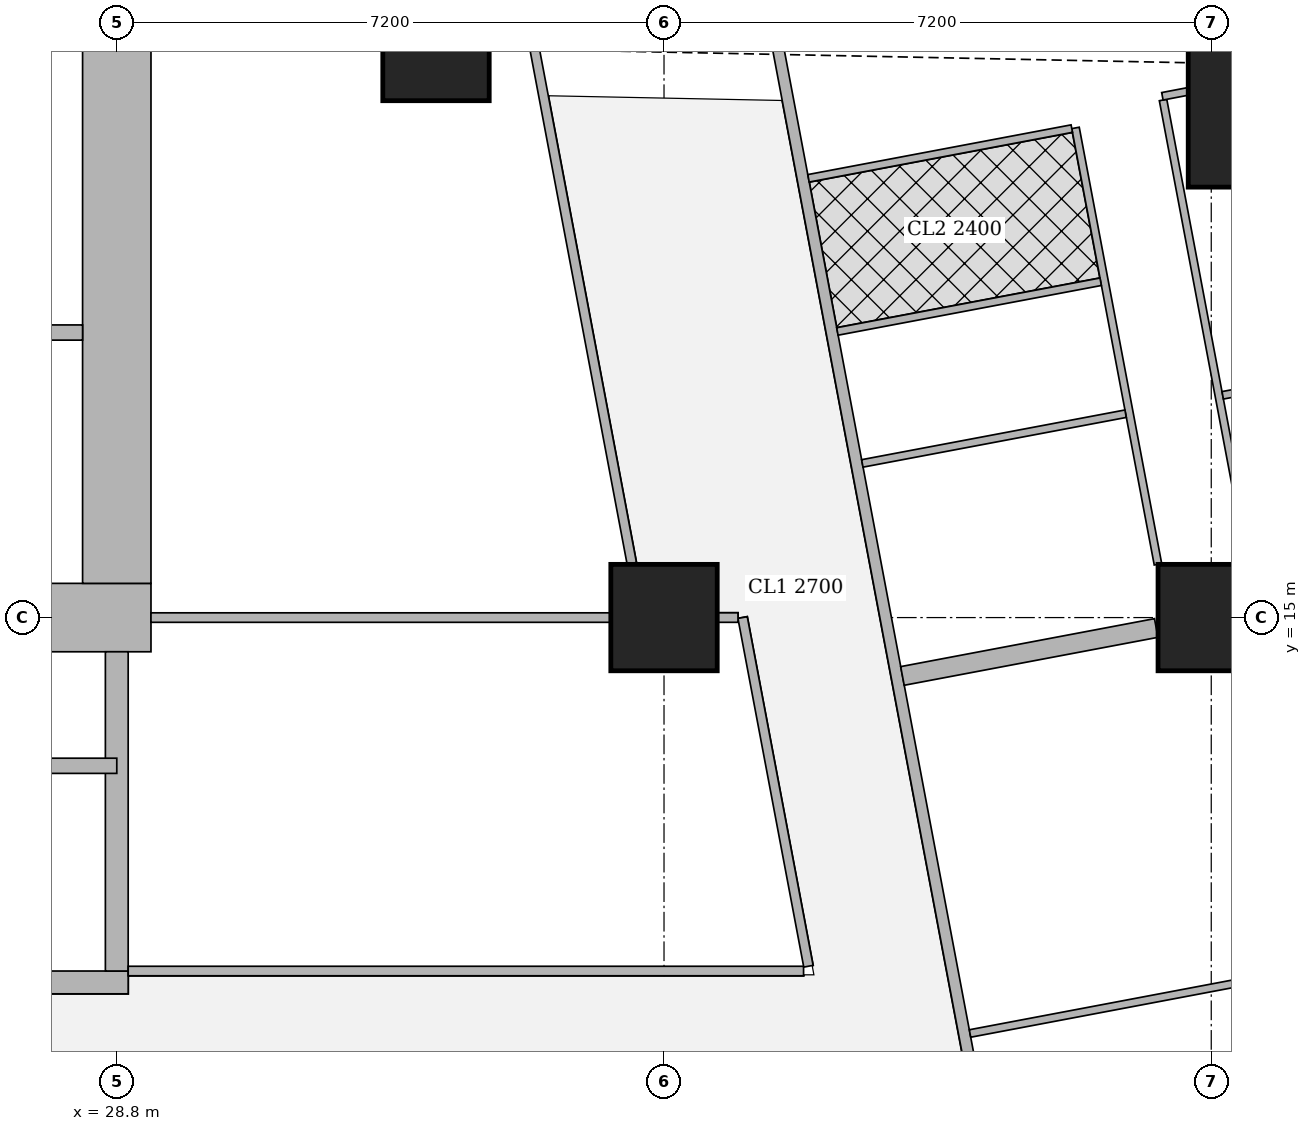
"""IFC4 building model, lengths in metres.
Left out: names, types, materials, properties, quantities, classifications, styles, units other than length and angle.
Written with IfcOpenShell. Run it as: python <this file> out.ifc"""

import sys

from ifc_helpers import new_model, si_unit, direction, frame, frame_2d, origin, origin_2d, place, context, subcontext, project, spatial, rectangle, extrude, element, fill, save


model = new_model("IFC4")
c1 = context("Model", 3, precision=1e-05, world=origin(), true_north=direction((0.0, 1.0)))
c2 = subcontext(c1, "Body", "Model", "MODEL_VIEW")
j1 = project(units=[si_unit("LENGTHUNIT", "METRE"), si_unit("PLANEANGLEUNIT", "RADIAN")], contexts=[c1])
p1 = place(None, origin())
s1 = spatial("IfcSite", under=j1, at=p1, CompositionType="ELEMENT")
p2 = place(p1, origin())
s2 = spatial("IfcBuilding", under=s1, at=p2, CompositionType="ELEMENT")
p3 = place(p2, frame((0.0, 0.0, 223.7)))
s3 = spatial("IfcBuildingStorey", under=s2, at=p3, CompositionType="ELEMENT", Elevation=223.7)
for number, where, z_axis, x_axis in (
    (1, (36.0, 15.0, 0.0), (0.0, 0.0, 1.0), (1.0, 0.0, 0.0)),
    (2, (43.2, 15.0, 0.0), (0.0, 0.0, 1.0), (1.0, 0.0, 0.0)),
    (3, (33.0, 22.5, 0.0), (0.0, 0.0, 1.0), (1.0, 0.0, 0.0)),
):
    element("IfcColumn", number, at=place(p3, frame(where, z_axis=z_axis, x_axis=x_axis)), inside=s3, PredefinedType="COLUMN", context=c2, shape_type="SweptSolid", body=[
        extrude(rectangle(XDim=1.4, YDim=1.4, at=origin_2d()), origin(), (0.0, 0.0, 1.0), 3.75),
    ])
p4 = place(p3, frame((44.697, 22.263, 0.0), z_axis=(0.0, 0.0, 1.0), x_axis=(1.0, 0.0, 0.0)))
e4 = element("IfcColumn", 4, at=p4, inside=s3, PredefinedType="COLUMN", context=c2, shape_type="SweptSolid", body=[
    extrude(rectangle(XDim=3.6, YDim=3.2, at=origin_2d()), origin(), (0.0, 0.0, 1.0), 3.75),
])
p5 = place(p3, frame((13.95, 15.0, 0.0), z_axis=(0.0, 0.0, 1.0), x_axis=(1.0, 0.0, 0.0)))
e5 = element("IfcWall", 5, at=p5, inside=s3, PredefinedType="SHEAR", context=c2, shape_type="SweptSolid", body=[
    extrude(rectangle(XDim=15.3, YDim=0.9, at=frame_2d((7.65, 0.0))), origin(), (0.0, 0.0, 1.0), 3.75),
])
p6 = place(p5, frame((4.45, 0.0, 0.0)))
e6 = element("IfcOpeningElement", 6, at=p6, cuts=e5, PredefinedType="OPENING", context=c2, shape_type="SweptSolid", body=[
    extrude(rectangle(XDim=1.8, YDim=2.1, at=frame_2d((0.9, 1.05))), frame((0.0, 0.46, 0.0), z_axis=(0.0, -1.0, 0.0), x_axis=(1.0, 0.0, 0.0)), (0.0, 0.0, 1.0), 0.92),
])
p7 = place(p5, frame((10.7, 0.0, 0.0)))
e7 = element("IfcOpeningElement", 7, at=p7, cuts=e5, PredefinedType="OPENING", context=c2, shape_type="SweptSolid", body=[
    extrude(rectangle(XDim=1.1, YDim=2.1, at=frame_2d((0.55, 1.05))), frame((0.0, 0.46, 0.0), z_axis=(0.0, -1.0, 0.0), x_axis=(1.0, 0.0, 0.0)), (0.0, 0.0, 1.0), 0.92),
])
p8 = place(p3, frame((28.8, 15.45, 0.0), z_axis=(0.0, 0.0, 1.0), x_axis=(0.0, 1.0, 0.0)))
e8 = element("IfcWall", 8, at=p8, inside=s3, PredefinedType="SHEAR", context=c2, shape_type="SweptSolid", body=[
    extrude(rectangle(XDim=14.1, YDim=0.9, at=frame_2d((7.05, 0.0))), origin(), (0.0, 0.0, 1.0), 3.75),
])
p9 = place(p3, frame((21.45, 10.2, 0.0), z_axis=(0.0, 0.0, 1.0), x_axis=(1.0, 0.0, 0.0)))
e9 = element("IfcWall", 9, at=p9, inside=s3, PredefinedType="SHEAR", context=c2, shape_type="SweptSolid", body=[
    extrude(rectangle(XDim=7.5, YDim=0.3, at=frame_2d((3.75, 0.0))), origin(), (0.0, 0.0, 1.0), 3.75),
])
p10 = place(p9, frame((0.5, 0.0, 0.0)))
e10 = element("IfcOpeningElement", 10, at=p10, cuts=e9, PredefinedType="OPENING", context=c2, shape_type="SweptSolid", body=[
    extrude(rectangle(XDim=1.1, YDim=2.1, at=frame_2d((0.55, 1.05))), frame((0.0, 0.16, 0.0), z_axis=(0.0, -1.0, 0.0), x_axis=(1.0, 0.0, 0.0)), (0.0, 0.0, 1.0), 0.32),
])
p11 = place(p3, frame((28.8, 10.35, 0.0), z_axis=(0.0, 0.0, 1.0), x_axis=(0.0, 1.0, 0.0)))
e11 = element("IfcWall", 11, at=p11, inside=s3, PredefinedType="SHEAR", context=c2, shape_type="SweptSolid", body=[
    extrude(rectangle(XDim=4.2, YDim=0.3, at=frame_2d((2.1, 0.0))), origin(), (0.0, 0.0, 1.0), 3.75),
])
p12 = place(p3, frame((50.653, 2.703, 0.0), z_axis=(0.0, 0.0, 1.0), x_axis=(-0.185612026696, 0.982623109613, 0.0)))
e12 = element("IfcWall", 12, at=p12, inside=s3, PredefinedType="SOLIDWALL", context=c2, shape_type="SweptSolid", body=[
    extrude(rectangle(XDim=41.393, YDim=0.2, at=frame_2d((20.697, 0.0))), origin(), (0.0, 0.0, 1.0), 3.5),
])
p13 = place(p12, frame((1.633, 0.0, 0.9)))
e13 = element("IfcOpeningElement", 13, at=p13, cuts=e12, PredefinedType="OPENING", context=c2, shape_type="SweptSolid", body=[
    extrude(rectangle(XDim=1.8, YDim=1.5, at=frame_2d((0.9, 0.75))), frame((0.0, 0.11, 0.0), z_axis=(0.0, -1.0, 0.0), x_axis=(1.0, 0.0, 0.0)), (0.0, 0.0, 1.0), 0.22),
])
p14 = place(p12, frame((6.032, 0.0, 0.9)))
e14 = element("IfcOpeningElement", 14, at=p14, cuts=e12, PredefinedType="OPENING", context=c2, shape_type="SweptSolid", body=[
    extrude(rectangle(XDim=1.8, YDim=1.5, at=frame_2d((0.9, 0.75))), frame((0.0, 0.11, 0.0), z_axis=(0.0, -1.0, 0.0), x_axis=(1.0, 0.0, 0.0)), (0.0, 0.0, 1.0), 0.22),
])
p15 = place(p12, frame((9.848, 0.0, 0.9)))
e15 = element("IfcOpeningElement", 15, at=p15, cuts=e12, PredefinedType="OPENING", context=c2, shape_type="SweptSolid", body=[
    extrude(rectangle(XDim=1.8, YDim=1.5, at=frame_2d((0.9, 0.75))), frame((0.0, 0.11, 0.0), z_axis=(0.0, -1.0, 0.0), x_axis=(1.0, 0.0, 0.0)), (0.0, 0.0, 1.0), 0.22),
])
p16 = place(p12, frame((13.664, 0.0, 0.9)))
e16 = element("IfcOpeningElement", 16, at=p16, cuts=e12, PredefinedType="OPENING", context=c2, shape_type="SweptSolid", body=[
    extrude(rectangle(XDim=1.8, YDim=1.5, at=frame_2d((0.9, 0.75))), frame((0.0, 0.11, 0.0), z_axis=(0.0, -1.0, 0.0), x_axis=(1.0, 0.0, 0.0)), (0.0, 0.0, 1.0), 0.22),
])
p17 = place(p12, frame((17.481, 0.0, 0.9)))
e17 = element("IfcOpeningElement", 17, at=p17, cuts=e12, PredefinedType="OPENING", context=c2, shape_type="SweptSolid", body=[
    extrude(rectangle(XDim=1.8, YDim=1.5, at=frame_2d((0.9, 0.75))), frame((0.0, 0.11, 0.0), z_axis=(0.0, -1.0, 0.0), x_axis=(1.0, 0.0, 0.0)), (0.0, 0.0, 1.0), 0.22),
])
p18 = place(p12, frame((21.297, 0.0, 0.9)))
e18 = element("IfcOpeningElement", 18, at=p18, cuts=e12, PredefinedType="OPENING", context=c2, shape_type="SweptSolid", body=[
    extrude(rectangle(XDim=1.8, YDim=1.5, at=frame_2d((0.9, 0.75))), frame((0.0, 0.11, 0.0), z_axis=(0.0, -1.0, 0.0), x_axis=(1.0, 0.0, 0.0)), (0.0, 0.0, 1.0), 0.22),
])
p19 = place(p12, frame((25.113, 0.0, 0.9)))
e19 = element("IfcOpeningElement", 19, at=p19, cuts=e12, PredefinedType="OPENING", context=c2, shape_type="SweptSolid", body=[
    extrude(rectangle(XDim=1.8, YDim=1.5, at=frame_2d((0.9, 0.75))), frame((0.0, 0.11, 0.0), z_axis=(0.0, -1.0, 0.0), x_axis=(1.0, 0.0, 0.0)), (0.0, 0.0, 1.0), 0.22),
])
p20 = place(p12, frame((28.93, 0.0, 0.9)))
e20 = element("IfcOpeningElement", 20, at=p20, cuts=e12, PredefinedType="OPENING", context=c2, shape_type="SweptSolid", body=[
    extrude(rectangle(XDim=1.8, YDim=1.5, at=frame_2d((0.9, 0.75))), frame((0.0, 0.11, 0.0), z_axis=(0.0, -1.0, 0.0), x_axis=(1.0, 0.0, 0.0)), (0.0, 0.0, 1.0), 0.22),
])
p21 = place(p12, frame((32.746, 0.0, 0.9)))
e21 = element("IfcOpeningElement", 21, at=p21, cuts=e12, PredefinedType="OPENING", context=c2, shape_type="SweptSolid", body=[
    extrude(rectangle(XDim=1.8, YDim=1.5, at=frame_2d((0.9, 0.75))), frame((0.0, 0.11, 0.0), z_axis=(0.0, -1.0, 0.0), x_axis=(1.0, 0.0, 0.0)), (0.0, 0.0, 1.0), 0.22),
])
p22 = place(p12, frame((36.481, 0.0, 0.9)))
e22 = element("IfcOpeningElement", 22, at=p22, cuts=e12, PredefinedType="OPENING", context=c2, shape_type="SweptSolid", body=[
    extrude(rectangle(XDim=1.8, YDim=1.5, at=frame_2d((0.9, 0.75))), frame((0.0, 0.11, 0.0), z_axis=(0.0, -1.0, 0.0), x_axis=(1.0, 0.0, 0.0)), (0.0, 0.0, 1.0), 0.22),
])
p23 = place(p3, frame((33.68, 42.723, 0.0), z_axis=(0.0, 0.0, 1.0), x_axis=(0.185601160014, -0.982625162207, 0.0)))
e23 = element("IfcWall", 23, at=p23, inside=s3, PredefinedType="SOLIDWALL", context=c2, shape_type="SweptSolid", body=[
    extrude(rectangle(XDim=41.051, YDim=0.15, at=frame_2d((20.526, 0.0))), origin(), (0.0, 0.0, 1.0), 2.5),
])
p24 = place(p23, frame((16.123, 0.0, 0.0)))
e24 = element("IfcOpeningElement", 24, at=p24, cuts=e23, PredefinedType="OPENING", context=c2, shape_type="SweptSolid", body=[
    extrude(rectangle(XDim=1.0, YDim=2.1, at=frame_2d((0.5, 1.05))), frame((0.0, 0.085, 0.0), z_axis=(0.0, -1.0, 0.0), x_axis=(1.0, 0.0, 0.0)), (0.0, 0.0, 1.0), 0.17),
])
p25 = place(p23, frame((19.938, 0.0, 0.0)))
e25 = element("IfcOpeningElement", 25, at=p25, cuts=e23, PredefinedType="OPENING", context=c2, shape_type="SweptSolid", body=[
    extrude(rectangle(XDim=1.0, YDim=2.1, at=frame_2d((0.5, 1.05))), frame((0.0, 0.085, 0.0), z_axis=(0.0, -1.0, 0.0), x_axis=(1.0, 0.0, 0.0)), (0.0, 0.0, 1.0), 0.17),
])
p26 = place(p23, frame((30.902, 0.0, 0.0)))
e26 = element("IfcOpeningElement", 26, at=p26, cuts=e23, PredefinedType="OPENING", context=c2, shape_type="SweptSolid", body=[
    extrude(rectangle(XDim=1.0, YDim=2.1, at=frame_2d((0.5, 1.05))), frame((0.0, 0.085, 0.0), z_axis=(0.0, -1.0, 0.0), x_axis=(1.0, 0.0, 0.0)), (0.0, 0.0, 1.0), 0.17),
])
p27 = place(p3, frame((42.566, 21.809, 0.0), z_axis=(0.0, 0.0, 1.0), x_axis=(0.185613526435, -0.98262282632, 0.0)))
e27 = element("IfcWall", 27, at=p27, inside=s3, PredefinedType="PARTITIONING", context=c2, shape_type="SweptSolid", body=[
    extrude(rectangle(XDim=6.207, YDim=0.1, at=frame_2d((3.104, 0.0))), origin(), (0.0, 0.0, 1.0), 2.5),
])
p28 = place(p27, frame((1.45, 0.0, 0.0)))
e28 = element("IfcOpeningElement", 28, at=p28, cuts=e27, PredefinedType="OPENING", context=c2, shape_type="SweptSolid", body=[
    extrude(rectangle(XDim=0.9, YDim=2.1, at=frame_2d((0.45, 1.05))), frame((0.0, 0.06, 0.0), z_axis=(0.0, -1.0, 0.0), x_axis=(1.0, 0.0, 0.0)), (0.0, 0.0, 1.0), 0.12),
])
p29 = place(p27, frame((4.163, 0.0, 0.0)))
e29 = element("IfcOpeningElement", 29, at=p29, cuts=e27, PredefinedType="OPENING", context=c2, shape_type="SweptSolid", body=[
    extrude(rectangle(XDim=0.9, YDim=2.1, at=frame_2d((0.45, 1.05))), frame((0.0, 0.06, 0.0), z_axis=(0.0, -1.0, 0.0), x_axis=(1.0, 0.0, 0.0)), (0.0, 0.0, 1.0), 0.12),
])
p30 = place(p3, frame((41.414, 21.442, 0.0), z_axis=(0.0, 0.0, 1.0), x_axis=(0.185698675093, -0.982606738257, 0.0)))
e30 = element("IfcWall", 30, at=p30, inside=s3, PredefinedType="PARTITIONING", context=c2, shape_type="SweptSolid", body=[
    extrude(rectangle(XDim=5.843, YDim=0.1, at=frame_2d((2.921, 0.0))), origin(), (0.0, 0.0, 1.0), 3.5),
])
p31 = place(p30, frame((0.575, 0.0, 0.0)))
e31 = element("IfcOpeningElement", 31, at=p31, cuts=e30, PredefinedType="OPENING", context=c2, shape_type="SweptSolid", body=[
    extrude(rectangle(XDim=0.9, YDim=2.1, at=frame_2d((0.45, 1.05))), frame((0.0, 0.06, 0.0), z_axis=(0.0, -1.0, 0.0), x_axis=(1.0, 0.0, 0.0)), (0.0, 0.0, 1.0), 0.12),
])
p32 = place(p30, frame((2.483, 0.0, 0.0)))
e32 = element("IfcOpeningElement", 32, at=p32, cuts=e30, PredefinedType="OPENING", context=c2, shape_type="SweptSolid", body=[
    extrude(rectangle(XDim=0.9, YDim=2.1, at=frame_2d((0.45, 1.05))), frame((0.0, 0.06, 0.0), z_axis=(0.0, -1.0, 0.0), x_axis=(1.0, 0.0, 0.0)), (0.0, 0.0, 1.0), 0.12),
])
p33 = place(p3, frame((42.887, 21.921, 0.0), z_axis=(0.0, 0.0, 1.0), x_axis=(-0.982274918032, -0.187445953293, 0.0)))
e33 = element("IfcWall", 33, at=p33, inside=s3, PredefinedType="PARTITIONING", context=c2, shape_type="SweptSolid", body=[
    extrude(rectangle(XDim=0.336, YDim=0.1, at=frame_2d((0.168, 0.0))), origin(), (0.0, 0.0, 1.0), 2.5),
])
p34 = place(p3, frame((47.527, 18.712, 0.0), z_axis=(0.0, 0.0, 1.0), x_axis=(-0.982665405803, -0.185387972203, 0.0)))
e34 = element("IfcWall", 34, at=p34, inside=s3, PredefinedType="PARTITIONING", context=c2, shape_type="SweptSolid", body=[
    extrude(rectangle(XDim=4.25, YDim=0.1, at=frame_2d((2.125, 0.0))), origin(), (0.0, 0.0, 1.0), 2.05),
])
p35 = place(p3, frame((41.365, 21.433, 0.0), z_axis=(0.0, 0.0, 1.0), x_axis=(-0.982638553676, -0.185530247748, 0.0)))
e35 = element("IfcWall", 35, at=p35, inside=s3, PredefinedType="PARTITIONING", context=c2, shape_type="SweptSolid", body=[
    extrude(rectangle(XDim=3.525, YDim=0.1, at=frame_2d((1.763, 0.0))), origin(), (0.0, 0.0, 1.0), 3.5),
])
p36 = place(p3, frame((42.073, 17.682, 0.0), z_axis=(0.0, 0.0, 1.0), x_axis=(-0.98265117712, -0.185463376723, 0.0)))
e36 = element("IfcWall", 36, at=p36, inside=s3, PredefinedType="PARTITIONING", context=c2, shape_type="SweptSolid", body=[
    extrude(rectangle(XDim=3.525, YDim=0.1, at=frame_2d((1.763, 0.0))), origin(), (0.0, 0.0, 1.0), 3.5),
])
p37 = place(p36, frame((1.325, 0.0, 0.0)))
e37 = element("IfcOpeningElement", 37, at=p37, cuts=e36, PredefinedType="OPENING", context=c2, shape_type="SweptSolid", body=[
    extrude(rectangle(XDim=0.9, YDim=2.1, at=frame_2d((0.45, 1.05))), frame((0.0, 0.06, 0.0), z_axis=(0.0, -1.0, 0.0), x_axis=(1.0, 0.0, 0.0)), (0.0, 0.0, 1.0), 0.12),
])
p38 = place(p3, frame((41.745, 19.418, 0.0), z_axis=(0.0, 0.0, 1.0), x_axis=(-0.982638553676, -0.185530247748, 0.0)))
e38 = element("IfcWall", 38, at=p38, inside=s3, PredefinedType="PARTITIONING", context=c2, shape_type="SweptSolid", body=[
    extrude(rectangle(XDim=3.525, YDim=0.1, at=frame_2d((1.763, 0.0))), origin(), (0.0, 0.0, 1.0), 3.5),
])
p39 = place(p3, frame((43.49, 10.183, 0.0), z_axis=(0.0, 0.0, 1.0), x_axis=(-0.982588017646, -0.185797706064, 0.0)))
e39 = element("IfcWall", 39, at=p39, inside=s3, PredefinedType="PARTITIONING", context=c2, shape_type="SweptSolid", body=[
    extrude(rectangle(XDim=3.525, YDim=0.1, at=frame_2d((1.763, 0.0))), origin(), (0.0, 0.0, 1.0), 3.5),
])
p40 = place(p39, frame((1.325, 0.0, 0.0)))
e40 = element("IfcOpeningElement", 40, at=p40, cuts=e39, PredefinedType="OPENING", context=c2, shape_type="SweptSolid", body=[
    extrude(rectangle(XDim=0.9, YDim=2.1, at=frame_2d((0.45, 1.05))), frame((0.0, 0.06, 0.0), z_axis=(0.0, -1.0, 0.0), x_axis=(1.0, 0.0, 0.0)), (0.0, 0.0, 1.0), 0.12),
])
p41 = place(p3, frame((42.476, 14.863, 0.0), z_axis=(0.0, 0.0, 1.0), x_axis=(-0.982603567712, -0.185715450942, 0.0)))
e41 = element("IfcWall", 41, at=p41, inside=s3, PredefinedType="SOLIDWALL", context=c2, shape_type="SweptSolid", body=[
    extrude(rectangle(XDim=3.398, YDim=0.25, at=frame_2d((1.699, 0.0))), origin(), (0.0, 0.0, 1.0), 3.5),
])
p42 = place(p3, frame((28.95, 10.35, 0.0), z_axis=(0.0, 0.0, 1.0), x_axis=(1.0, 0.0, 0.0)))
e42 = element("IfcWall", 42, at=p42, inside=s3, PredefinedType="PARTITIONING", context=c2, shape_type="SweptSolid", body=[
    extrude(rectangle(XDim=8.886, YDim=0.125, at=frame_2d((4.443, 0.0))), origin(), (0.0, 0.0, 1.0), 3.5),
])
p43 = place(p3, frame((37.9, 10.413, 0.0), z_axis=(0.0, 0.0, 1.0), x_axis=(-0.185513629891, 0.982641691119, 0.0)))
e43 = element("IfcWall", 43, at=p43, inside=s3, PredefinedType="PARTITIONING", context=c2, shape_type="SweptSolid", body=[
    extrude(rectangle(XDim=4.668, YDim=0.125, at=frame_2d((2.334, 0.0))), origin(), (0.0, 0.0, 1.0), 3.5),
])
p44 = place(p43, frame((0.708, 0.0, 0.0)))
e44 = element("IfcOpeningElement", 44, at=p44, cuts=e43, PredefinedType="OPENING", context=c2, shape_type="SweptSolid", body=[
    extrude(rectangle(XDim=1.0, YDim=2.1, at=frame_2d((0.5, 1.05))), frame((0.0, 0.073, 0.0), z_axis=(0.0, -1.0, 0.0), x_axis=(1.0, 0.0, 0.0)), (0.0, 0.0, 1.0), 0.145),
])
p45 = place(p3, frame((35.576, 15.713, 0.0), z_axis=(0.0, 0.0, 1.0), x_axis=(-0.185602982696, 0.982624817931, 0.0)))
e45 = element("IfcWall", 45, at=p45, inside=s3, PredefinedType="PARTITIONING", context=c2, shape_type="SweptSolid", body=[
    extrude(rectangle(XDim=13.814, YDim=0.125, at=frame_2d((6.907, 0.0))), origin(), (0.0, 0.0, 1.0), 2.5),
])
p46 = place(p45, frame((5.3, 0.0, 0.0)))
e46 = element("IfcOpeningElement", 46, at=p46, cuts=e45, PredefinedType="OPENING", context=c2, shape_type="SweptSolid", body=[
    extrude(rectangle(XDim=1.0, YDim=2.1, at=frame_2d((0.5, 1.05))), frame((0.0, 0.073, 0.0), z_axis=(0.0, -1.0, 0.0), x_axis=(1.0, 0.0, 0.0)), (0.0, 0.0, 1.0), 0.145),
])
p47 = place(p3, frame((29.25, 15.0, 0.0), z_axis=(0.0, 0.0, 1.0), x_axis=(1.0, 0.0, 0.0)))
e47 = element("IfcWall", 47, at=p47, inside=s3, PredefinedType="PARTITIONING", context=c2, shape_type="SweptSolid", body=[
    extrude(rectangle(XDim=6.049, YDim=0.125, at=frame_2d((3.024, 0.0))), origin(), (0.0, 0.0, 1.0), 3.5),
])
p48 = place(p3, frame((36.701, 15.0, 0.0), z_axis=(0.0, 0.0, 1.0), x_axis=(1.0, 0.0, 0.0)))
e48 = element("IfcWall", 48, at=p48, inside=s3, PredefinedType="PARTITIONING", context=c2, shape_type="SweptSolid", body=[
    extrude(rectangle(XDim=0.272, YDim=0.125, at=frame_2d((0.136, 0.0))), origin(), (0.0, 0.0, 1.0), 3.5),
])
p49 = place(p3, frame((23.0, 13.05, 0.0), z_axis=(0.0, 0.0, 1.0), x_axis=(1.0, 0.0, 0.0)))
e49 = element("IfcWall", 49, at=p49, inside=s3, PredefinedType="SHEAR", context=c2, shape_type="SweptSolid", body=[
    extrude(rectangle(XDim=5.8, YDim=0.2, at=frame_2d((2.9, 0.0))), origin(), (0.0, 0.0, 1.0), 3.75),
])
p50 = place(p3, frame((27.4, 18.75, 0.0), z_axis=(0.0, 0.0, 1.0), x_axis=(1.0, 0.0, 0.0)))
e50 = element("IfcWall", 50, at=p50, inside=s3, PredefinedType="SOLIDWALL", context=c2, shape_type="SweptSolid", body=[
    extrude(rectangle(XDim=0.95, YDim=0.2, at=frame_2d((0.475, 0.0))), origin(), (0.0, 0.0, 1.0), 3.5),
])
p51 = place(p28, origin())
e51 = element("IfcDoor", 51, at=p51, inside=s3, OperationType="SINGLE_SWING_LEFT", PredefinedType="DOOR", context=c2, shape_type="SweptSolid", body=[
    extrude(rectangle(XDim=0.9, YDim=2.1, at=frame_2d((0.45, 1.05))), frame((0.0, 0.025, 0.0), z_axis=(0.0, -1.0, 0.0), x_axis=(1.0, 0.0, 0.0)), (0.0, 0.0, 1.0), 0.05),
])
fill(e28, e51)
p52 = place(p29, origin())
e52 = element("IfcDoor", 52, at=p52, inside=s3, OperationType="SINGLE_SWING_LEFT", PredefinedType="DOOR", context=c2, shape_type="SweptSolid", body=[
    extrude(rectangle(XDim=0.9, YDim=2.1, at=frame_2d((0.45, 1.05))), frame((0.0, 0.025, 0.0), z_axis=(0.0, -1.0, 0.0), x_axis=(1.0, 0.0, 0.0)), (0.0, 0.0, 1.0), 0.05),
])
fill(e29, e52)
p53 = place(p31, origin())
e53 = element("IfcDoor", 53, at=p53, inside=s3, OperationType="SINGLE_SWING_RIGHT", PredefinedType="DOOR", context=c2, shape_type="SweptSolid", body=[
    extrude(rectangle(XDim=0.9, YDim=2.1, at=frame_2d((0.45, 1.05))), frame((0.0, 0.025, 0.0), z_axis=(0.0, -1.0, 0.0), x_axis=(1.0, 0.0, 0.0)), (0.0, 0.0, 1.0), 0.05),
])
fill(e31, e53)
p54 = place(p32, origin())
e54 = element("IfcDoor", 54, at=p54, inside=s3, OperationType="SINGLE_SWING_RIGHT", PredefinedType="DOOR", context=c2, shape_type="SweptSolid", body=[
    extrude(rectangle(XDim=0.9, YDim=2.1, at=frame_2d((0.45, 1.05))), frame((0.0, 0.025, 0.0), z_axis=(0.0, -1.0, 0.0), x_axis=(1.0, 0.0, 0.0)), (0.0, 0.0, 1.0), 0.05),
])
fill(e32, e54)
p55 = place(p25, origin())
e55 = element("IfcDoor", 55, at=p55, inside=s3, OperationType="SINGLE_SWING_RIGHT", PredefinedType="DOOR", context=c2, shape_type="SweptSolid", body=[
    extrude(rectangle(XDim=1.0, YDim=2.1, at=frame_2d((0.5, 1.05))), frame((0.0, 0.025, 0.0), z_axis=(0.0, -1.0, 0.0), x_axis=(1.0, 0.0, 0.0)), (0.0, 0.0, 1.0), 0.05),
])
fill(e25, e55)
p56 = place(p26, origin())
e56 = element("IfcDoor", 56, at=p56, inside=s3, OperationType="SINGLE_SWING_LEFT", PredefinedType="DOOR", context=c2, shape_type="SweptSolid", body=[
    extrude(rectangle(XDim=1.0, YDim=2.1, at=frame_2d((0.5, 1.05))), frame((0.0, 0.025, 0.0), z_axis=(0.0, -1.0, 0.0), x_axis=(1.0, 0.0, 0.0)), (0.0, 0.0, 1.0), 0.05),
])
fill(e26, e56)
p57 = place(p40, origin())
e57 = element("IfcDoor", 57, at=p57, inside=s3, OperationType="SINGLE_SWING_LEFT", PredefinedType="DOOR", context=c2, shape_type="SweptSolid", body=[
    extrude(rectangle(XDim=0.9, YDim=2.1, at=frame_2d((0.45, 1.05))), frame((0.0, 0.025, 0.0), z_axis=(0.0, -1.0, 0.0), x_axis=(1.0, 0.0, 0.0)), (0.0, 0.0, 1.0), 0.05),
])
fill(e40, e57)
p58 = place(p37, origin())
e58 = element("IfcDoor", 58, at=p58, inside=s3, OperationType="SINGLE_SWING_RIGHT", PredefinedType="DOOR", context=c2, shape_type="SweptSolid", body=[
    extrude(rectangle(XDim=0.9, YDim=2.1, at=frame_2d((0.45, 1.05))), frame((0.0, 0.025, 0.0), z_axis=(0.0, -1.0, 0.0), x_axis=(1.0, 0.0, 0.0)), (0.0, 0.0, 1.0), 0.05),
])
fill(e37, e58)
p59 = place(p44, origin())
e59 = element("IfcDoor", 59, at=p59, inside=s3, OperationType="SINGLE_SWING_LEFT", PredefinedType="DOOR", context=c2, shape_type="SweptSolid", body=[
    extrude(rectangle(XDim=1.0, YDim=2.1, at=frame_2d((0.5, 1.05))), frame((0.0, 0.025, 0.0), z_axis=(0.0, -1.0, 0.0), x_axis=(1.0, 0.0, 0.0)), (0.0, 0.0, 1.0), 0.05),
])
fill(e44, e59)
p60 = place(p46, origin())
e60 = element("IfcDoor", 60, at=p60, inside=s3, OperationType="SINGLE_SWING_LEFT", PredefinedType="DOOR", context=c2, shape_type="SweptSolid", body=[
    extrude(rectangle(XDim=1.0, YDim=2.1, at=frame_2d((0.5, 1.05))), frame((0.0, 0.025, 0.0), z_axis=(0.0, -1.0, 0.0), x_axis=(1.0, 0.0, 0.0)), (0.0, 0.0, 1.0), 0.05),
])
fill(e46, e60)
save(model, sys.argv[1])
